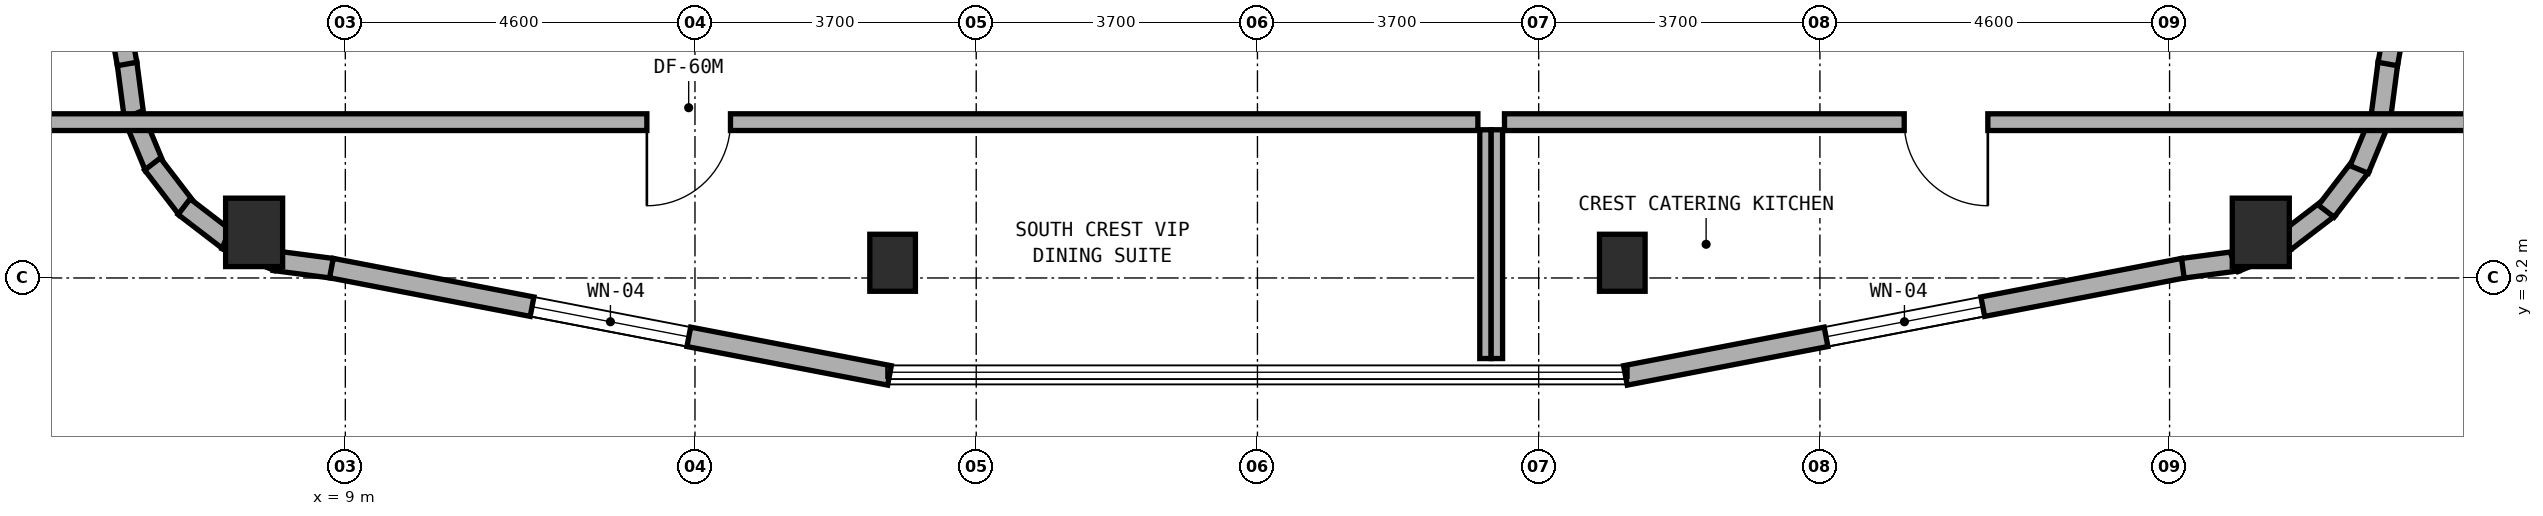
"""IFC4 building model, lengths in metres.
Left out: names, types, materials, properties, quantities, classifications, styles, units other than length and angle.
Written with IfcOpenShell. Run it as: python <this file> out.ifc"""

import sys

from ifc_helpers import new_model, si_unit, direction, frame, frame_2d, origin, origin_2d, place, context, subcontext, project, spatial, rectangle, extrude, element, fill, save


model = new_model("IFC4")
c1 = context("Model", 3, precision=1e-05, world=origin(), true_north=direction((0.0, 1.0)))
c2 = subcontext(c1, "Body", "Model", "MODEL_VIEW")
j1 = project(units=[si_unit("LENGTHUNIT", "METRE"), si_unit("PLANEANGLEUNIT", "RADIAN")], contexts=[c1])
p1 = place(None, origin())
s1 = spatial("IfcSite", under=j1, at=p1, CompositionType="ELEMENT")
p2 = place(p1, origin())
s2 = spatial("IfcBuilding", under=s1, at=p2, CompositionType="ELEMENT")
p3 = place(p2, frame((0.0, 0.0, 272.0)))
s3 = spatial("IfcBuildingStorey", under=s2, at=p3, CompositionType="ELEMENT", Elevation=272.0)
for number, where, z_axis, x_axis in (
    (1, (16.2, 9.4, 0.0), (0.0, 0.0, 1.0), (1.0, 0.0, 0.0)),
    (2, (25.8, 9.4, 0.0), (0.0, 0.0, 1.0), (1.0, 0.0, 0.0)),
):
    element("IfcColumn", number, at=place(p3, frame(where, z_axis=z_axis, x_axis=x_axis)), inside=s3, PredefinedType="COLUMN", context=c2, shape_type="SweptSolid", body=[
        extrude(rectangle(XDim=0.6, YDim=0.75, at=origin_2d()), origin(), (0.0, 0.0, 1.0), 4.8),
    ])
p4 = place(p3, frame((7.8, 9.8, 0.0), z_axis=(0.0, 0.0, 1.0), x_axis=(1.0, 0.0, 0.0)))
e3 = element("IfcColumn", 3, at=p4, inside=s3, PredefinedType="COLUMN", context=c2, shape_type="SweptSolid", body=[
    extrude(rectangle(XDim=0.75, YDim=0.9, at=origin_2d()), origin(), (0.0, 0.0, 1.0), 3.408),
])
p5 = place(p3, frame((34.2, 9.8, 0.0), z_axis=(0.0, 0.0, 1.0), x_axis=(1.0, 0.0, 0.0)))
e4 = element("IfcColumn", 4, at=p5, inside=s3, PredefinedType="COLUMN", context=c2, shape_type="SweptSolid", body=[
    extrude(rectangle(XDim=0.75, YDim=0.9, at=origin_2d()), origin(), (0.0, 0.0, 1.0), 4.8),
])
p6 = place(p3, frame((6.128, 12.025, 0.0), z_axis=(0.0, 0.0, 1.0), x_axis=(0.130255288807, -0.991480488834, 0.0)))
e5 = element("IfcWall", 5, at=p6, inside=s3, PredefinedType="STANDARD", context=c2, shape_type="SweptSolid", body=[
    extrude(rectangle(XDim=0.729, YDim=0.26, at=frame_2d((0.365, 0.0))), origin(), (0.0, 0.0, 1.0), 2.74),
])
p7 = place(p3, frame((6.205, 11.348, 0.0), z_axis=(0.0, 0.0, 1.0), x_axis=(0.383267045233, -0.923637576129, 0.0)))
e6 = element("IfcWall", 6, at=p7, inside=s3, PredefinedType="STANDARD", context=c2, shape_type="SweptSolid", body=[
    extrude(rectangle(XDim=0.746, YDim=0.26, at=frame_2d((0.373, 0.0))), origin(), (0.0, 0.0, 1.0), 2.74),
])
for number, where, z_axis, x_axis in (
    (7, (6.463, 10.699, 0.0), (0.0, 0.0, 1.0), (0.609, -0.793, 0.0)),
    (8, (6.879, 10.138, 0.0), (0.0, 0.0, 1.0), (0.794, -0.608, 0.0)),
    (9, (7.427, 9.705, 0.0), (0.0, 0.0, 1.0), (0.924, -0.384, 0.0)),
):
    element("IfcWall", number, at=place(p3, frame(where, z_axis=z_axis, x_axis=x_axis)), inside=s3, PredefinedType="STANDARD", context=c2, shape_type="SweptSolid", body=[
        extrude(rectangle(XDim=0.746, YDim=0.26, at=frame_2d((0.373, 0.0))), origin(), (0.0, 0.0, 1.0), 2.74),
    ])
p8 = place(p3, frame((8.067, 9.427, 0.0), z_axis=(0.0, 0.0, 1.0), x_axis=(0.991559404866, -0.129653178221, 0.0)))
e10 = element("IfcWall", 10, at=p8, inside=s3, PredefinedType="STANDARD", context=c2, shape_type="SweptSolid", body=[
    extrude(rectangle(XDim=0.764, YDim=0.26, at=frame_2d((0.382, 0.0))), origin(), (0.0, 0.0, 1.0), 2.74),
])
p9 = place(p3, frame((8.817, 9.33, 0.0), z_axis=(0.0, 0.0, 1.0), x_axis=(0.982002021426, -0.188870405079, 0.0)))
e11 = element("IfcWall", 11, at=p9, inside=s3, PredefinedType="STANDARD", context=c2, shape_type="SweptSolid", body=[
    extrude(rectangle(XDim=7.477, YDim=0.26, at=frame_2d((3.738, 0.0))), origin(), (0.0, 0.0, 1.0), 2.74),
])
p10 = place(p9, frame((2.688, 0.0, 0.85)))
e12 = element("IfcOpeningElement", 12, at=p10, cuts=e11, PredefinedType="OPENING", context=c2, shape_type="SweptSolid", body=[
    extrude(rectangle(XDim=2.1, YDim=1.5, at=frame_2d((1.05, 0.75))), frame((0.0, 0.14, 0.0), z_axis=(0.0, -1.0, 0.0), x_axis=(1.0, 0.0, 0.0)), (0.0, 0.0, 1.0), 0.28),
])
p11 = place(p3, frame((25.841, 7.918, 0.0), z_axis=(0.0, 0.0, 1.0), x_axis=(0.982002021426, 0.188870405079, 0.0)))
e13 = element("IfcWall", 13, at=p11, inside=s3, PredefinedType="STANDARD", context=c2, shape_type="SweptSolid", body=[
    extrude(rectangle(XDim=7.477, YDim=0.26, at=frame_2d((3.738, 0.0))), origin(), (0.0, 0.0, 1.0), 2.74),
])
p12 = place(p11, frame((2.688, 0.0, 0.85)))
e14 = element("IfcOpeningElement", 14, at=p12, cuts=e13, PredefinedType="OPENING", context=c2, shape_type="SweptSolid", body=[
    extrude(rectangle(XDim=2.1, YDim=1.5, at=frame_2d((1.05, 0.75))), frame((0.0, 0.14, 0.0), z_axis=(0.0, -1.0, 0.0), x_axis=(1.0, 0.0, 0.0)), (0.0, 0.0, 1.0), 0.28),
])
p13 = place(p3, frame((33.175, 9.328, 0.0), z_axis=(0.0, 0.0, 1.0), x_axis=(0.991437192142, 0.130584432602, 0.0)))
e15 = element("IfcWall", 15, at=p13, inside=s3, PredefinedType="STANDARD", context=c2, shape_type="SweptSolid", body=[
    extrude(rectangle(XDim=0.729, YDim=0.26, at=frame_2d((0.365, 0.0))), origin(), (0.0, 0.0, 1.0), 2.74),
])
p14 = place(p3, frame((33.852, 9.405, 0.0), z_axis=(0.0, 0.0, 1.0), x_axis=(0.923637576129, 0.383267045233, 0.0)))
e16 = element("IfcWall", 16, at=p14, inside=s3, PredefinedType="STANDARD", context=c2, shape_type="SweptSolid", body=[
    extrude(rectangle(XDim=0.746, YDim=0.26, at=frame_2d((0.373, 0.0))), origin(), (0.0, 0.0, 1.0), 2.74),
])
p15 = place(p3, frame((34.501, 9.663, 0.0), z_axis=(0.0, 0.0, 1.0), x_axis=(0.79363269798, 0.608397189915, 0.0)))
e17 = element("IfcWall", 17, at=p15, inside=s3, PredefinedType="STANDARD", context=c2, shape_type="SweptSolid", body=[
    extrude(rectangle(XDim=0.746, YDim=0.26, at=frame_2d((0.373, 0.0))), origin(), (0.0, 0.0, 1.0), 2.74),
])
for number, where, z_axis, x_axis in (
    (18, (35.062, 10.079, 0.0), (0.0, 0.0, 1.0), (0.609, 0.793, 0.0)),
    (19, (35.495, 10.627, 0.0), (0.0, 0.0, 1.0), (0.383, 0.924, 0.0)),
):
    element("IfcWall", number, at=place(p3, frame(where, z_axis=z_axis, x_axis=x_axis)), inside=s3, PredefinedType="STANDARD", context=c2, shape_type="SweptSolid", body=[
        extrude(rectangle(XDim=0.746, YDim=0.26, at=frame_2d((0.373, 0.0))), origin(), (0.0, 0.0, 1.0), 2.74),
    ])
p16 = place(p3, frame((35.773, 11.267, 0.0), z_axis=(0.0, 0.0, 1.0), x_axis=(0.12969424545, 0.991554034179, 0.0)))
e20 = element("IfcWall", 20, at=p16, inside=s3, PredefinedType="STANDARD", context=c2, shape_type="SweptSolid", body=[
    extrude(rectangle(XDim=0.764, YDim=0.26, at=frame_2d((0.382, 0.0))), origin(), (0.0, 0.0, 1.0), 2.74),
])
p17 = place(p3, frame((35.871, 12.015, 0.0), z_axis=(0.0, 0.0, 1.0), x_axis=(0.175766426993, 0.984431898682, 0.0)))
e21 = element("IfcWall", 21, at=p17, inside=s3, PredefinedType="STANDARD", context=c2, shape_type="SweptSolid", body=[
    extrude(rectangle(XDim=8.027, YDim=0.26, at=frame_2d((4.014, 0.0))), origin(), (0.0, 0.0, 1.0), 2.74),
])
p18 = place(p17, frame((3.751, 0.0, 0.85)))
e22 = element("IfcOpeningElement", 22, at=p18, cuts=e21, PredefinedType="OPENING", context=c2, shape_type="SweptSolid", body=[
    extrude(rectangle(XDim=2.1, YDim=1.5, at=frame_2d((1.05, 0.75))), frame((0.0, 0.14, 0.0), z_axis=(0.0, -1.0, 0.0), x_axis=(1.0, 0.0, 0.0)), (0.0, 0.0, 1.0), 0.28),
])
p19 = place(p3, frame((4.718, 19.917, 0.0), z_axis=(0.0, 0.0, 1.0), x_axis=(0.175766426993, -0.984431898682, 0.0)))
e23 = element("IfcWall", 23, at=p19, inside=s3, PredefinedType="STANDARD", context=c2, shape_type="SweptSolid", body=[
    extrude(rectangle(XDim=8.027, YDim=0.26, at=frame_2d((4.014, 0.0))), origin(), (0.0, 0.0, 1.0), 2.74),
])
p20 = place(p19, frame((0.347, 0.0, 0.85)))
e24 = element("IfcOpeningElement", 24, at=p20, cuts=e23, PredefinedType="OPENING", context=c2, shape_type="SweptSolid", body=[
    extrude(rectangle(XDim=1.5, YDim=1.5, at=frame_2d((0.75, 0.75))), frame((0.0, 0.14, 0.0), z_axis=(0.0, -1.0, 0.0), x_axis=(1.0, 0.0, 0.0)), (0.0, 0.0, 1.0), 0.28),
])
p21 = place(p19, frame((4.173, 0.0, 0.85)))
e25 = element("IfcOpeningElement", 25, at=p21, cuts=e23, PredefinedType="OPENING", context=c2, shape_type="SweptSolid", body=[
    extrude(rectangle(XDim=2.1, YDim=1.5, at=frame_2d((1.05, 0.75))), frame((0.0, 0.14, 0.0), z_axis=(0.0, -1.0, 0.0), x_axis=(1.0, 0.0, 0.0)), (0.0, 0.0, 1.0), 0.28),
])
p22 = place(p3, frame((24.0, 8.14, 0.0), z_axis=(0.0, 0.0, 1.0), x_axis=(0.0, 1.0, 0.0)))
e26 = element("IfcWall", 26, at=p22, inside=s3, PredefinedType="PARTITIONING", context=c2, shape_type="SweptSolid", body=[
    extrude(rectangle(XDim=3.01, YDim=0.15, at=frame_2d((1.505, 0.0))), origin(), (0.0, 0.0, 1.0), 2.72),
])
p23 = place(p3, frame((4.94, 11.25, 0.0), z_axis=(0.0, 0.0, 1.0), x_axis=(1.0, 0.0, 0.0)))
e27 = element("IfcWall", 27, at=p23, inside=s3, PredefinedType="SOLIDWALL", context=c2, shape_type="SweptSolid", body=[
    extrude(rectangle(XDim=18.96, YDim=0.22, at=frame_2d((9.48, 0.0))), origin(), (0.0, 0.0, 1.0), 2.72),
])
p24 = place(p23, frame((8.027, 0.0, 0.0)))
e28 = element("IfcOpeningElement", 28, at=p24, cuts=e27, PredefinedType="OPENING", context=c2, shape_type="SweptSolid", body=[
    extrude(rectangle(XDim=1.1, YDim=2.1, at=frame_2d((0.55, 1.05))), frame((0.0, 0.12, 0.0), z_axis=(0.0, -1.0, 0.0), x_axis=(1.0, 0.0, 0.0)), (0.0, 0.0, 1.0), 0.24),
])
p25 = place(p3, frame((24.15, 8.14, 0.0), z_axis=(0.0, 0.0, 1.0), x_axis=(0.0, 1.0, 0.0)))
e29 = element("IfcWall", 29, at=p25, inside=s3, PredefinedType="PARTITIONING", context=c2, shape_type="SweptSolid", body=[
    extrude(rectangle(XDim=3.01, YDim=0.15, at=frame_2d((1.505, 0.0))), origin(), (0.0, 0.0, 1.0), 2.72),
])
p26 = place(p3, frame((24.25, 11.25, 0.0), z_axis=(0.0, 0.0, 1.0), x_axis=(1.0, 0.0, 0.0)))
e30 = element("IfcWall", 30, at=p26, inside=s3, PredefinedType="SOLIDWALL", context=c2, shape_type="SweptSolid", body=[
    extrude(rectangle(XDim=12.81, YDim=0.22, at=frame_2d((6.405, 0.0))), origin(), (0.0, 0.0, 1.0), 2.72),
])
p27 = place(p26, frame((5.259, 0.0, 0.0)))
e31 = element("IfcOpeningElement", 31, at=p27, cuts=e30, PredefinedType="OPENING", context=c2, shape_type="SweptSolid", body=[
    extrude(rectangle(XDim=1.1, YDim=2.1, at=frame_2d((0.55, 1.05))), frame((0.0, 0.12, 0.0), z_axis=(0.0, -1.0, 0.0), x_axis=(1.0, 0.0, 0.0)), (0.0, 0.0, 1.0), 0.24),
])
p28 = place(p10, origin())
e32 = element("IfcWindow", 32, at=p28, inside=s3, PartitioningType="SINGLE_PANEL", PredefinedType="WINDOW", context=c2, shape_type="SweptSolid", body=[
    extrude(rectangle(XDim=2.1, YDim=1.5, at=frame_2d((1.05, 0.75))), frame((0.0, 0.03, 0.0), z_axis=(0.0, -1.0, 0.0), x_axis=(1.0, 0.0, 0.0)), (0.0, 0.0, 1.0), 0.06),
])
fill(e12, e32)
p29 = place(p12, origin())
e33 = element("IfcWindow", 33, at=p29, inside=s3, PartitioningType="SINGLE_PANEL", PredefinedType="WINDOW", context=c2, shape_type="SweptSolid", body=[
    extrude(rectangle(XDim=2.1, YDim=1.5, at=frame_2d((1.05, 0.75))), frame((0.0, 0.03, 0.0), z_axis=(0.0, -1.0, 0.0), x_axis=(1.0, 0.0, 0.0)), (0.0, 0.0, 1.0), 0.06),
])
fill(e14, e33)
p30 = place(p24, frame((1.1, 0.0, 0.0), z_axis=(0.0, 0.0, 1.0), x_axis=(-1.0, 0.0, 0.0)))
e34 = element("IfcDoor", 34, at=p30, inside=s3, OperationType="SINGLE_SWING_RIGHT", PredefinedType="DOOR", context=c2, shape_type="SweptSolid", body=[
    extrude(rectangle(XDim=1.1, YDim=2.1, at=frame_2d((0.55, 1.05))), frame((0.0, 0.025, 0.0), z_axis=(0.0, -1.0, 0.0), x_axis=(1.0, 0.0, 0.0)), (0.0, 0.0, 1.0), 0.05),
])
fill(e28, e34)
p31 = place(p27, frame((1.1, 0.0, 0.0), z_axis=(0.0, 0.0, 1.0), x_axis=(-1.0, 0.0, 0.0)))
e35 = element("IfcDoor", 35, at=p31, inside=s3, OperationType="SINGLE_SWING_LEFT", PredefinedType="DOOR", context=c2, shape_type="SweptSolid", body=[
    extrude(rectangle(XDim=1.1, YDim=2.1, at=frame_2d((0.55, 1.05))), frame((0.0, 0.025, 0.0), z_axis=(0.0, -1.0, 0.0), x_axis=(1.0, 0.0, 0.0)), (0.0, 0.0, 1.0), 0.05),
])
fill(e31, e35)
save(model, sys.argv[1])
